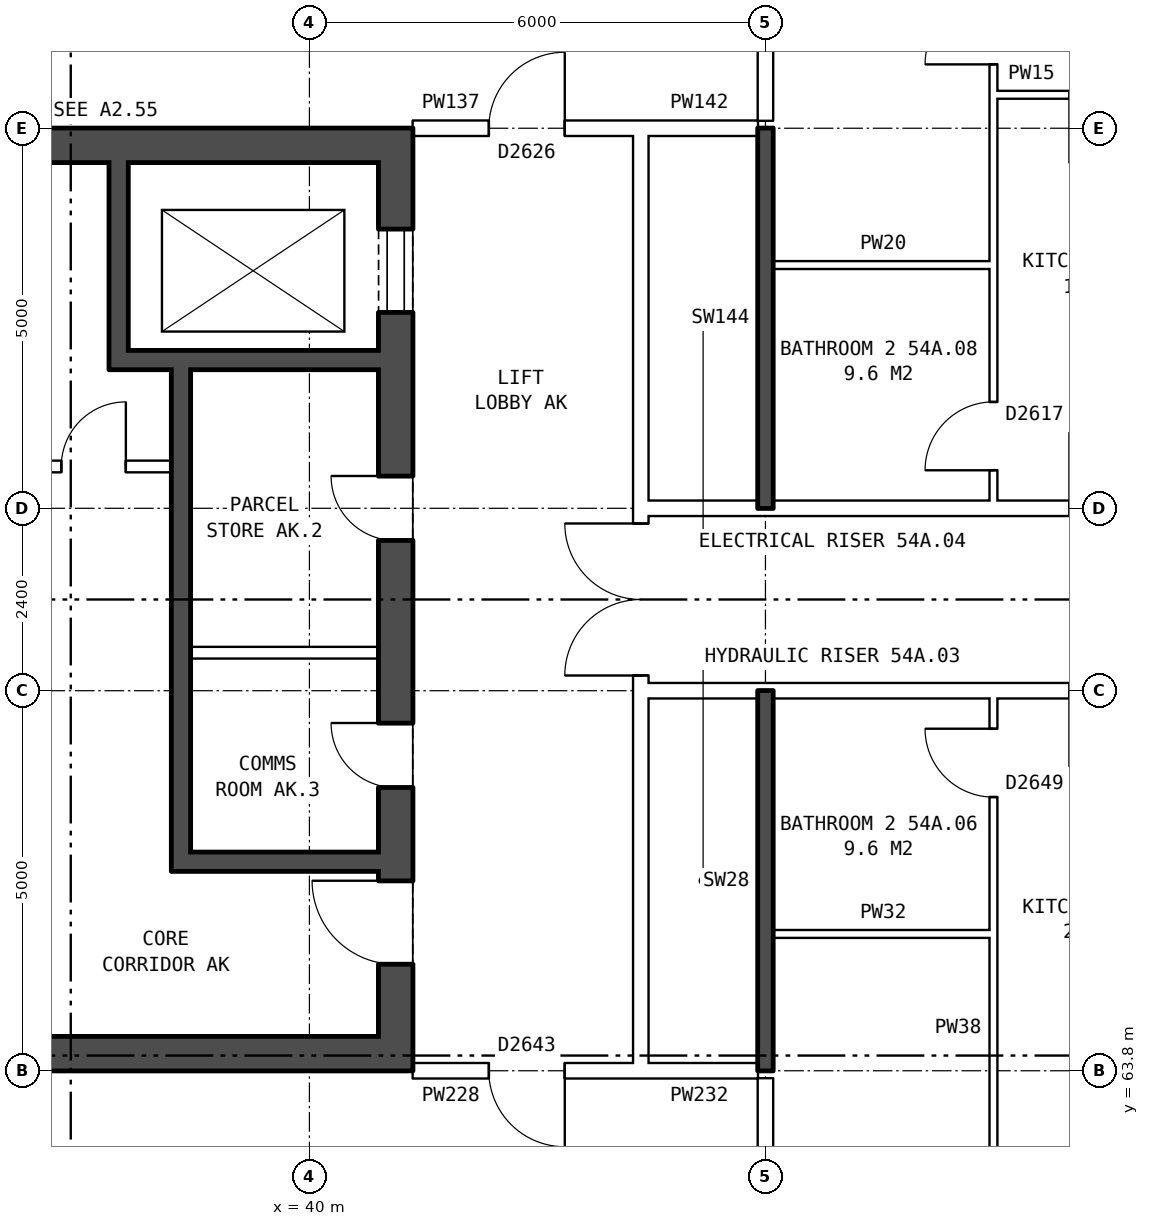
"""IFC4 building model, lengths in metres.
Left out: names, types, materials, properties, quantities, classifications, styles, units other than length and angle.
Written with IfcOpenShell. Run it as: python <this file> out.ifc"""

import sys

from ifc_helpers import new_model, si_unit, direction, frame, frame_2d, origin, place, context, subcontext, project, spatial, rectangle, extrude, element, fill, save


model = new_model("IFC4")
c1 = context("Model", 3, precision=1e-05, world=origin(), true_north=direction((0.0, 1.0)))
c2 = subcontext(c1, "Body", "Model", "MODEL_VIEW")
j1 = project(units=[si_unit("LENGTHUNIT", "METRE"), si_unit("PLANEANGLEUNIT", "RADIAN")], contexts=[c1])
p1 = place(None, origin())
s1 = spatial("IfcSite", under=j1, at=p1, CompositionType="ELEMENT")
p2 = place(p1, origin())
s2 = spatial("IfcBuilding", under=s1, at=p2, CompositionType="ELEMENT")
p3 = place(p2, frame((0.0, 0.0, 191.3)))
s3 = spatial("IfcBuildingStorey", under=s2, at=p3, CompositionType="ELEMENT", Elevation=191.3)
p4 = place(p3, frame((41.135, 76.2, 0.0), z_axis=(0.0, 0.0, 1.0), x_axis=(0.0, -1.0, 0.0)))
e1 = element("IfcWall", 1, at=p4, inside=s3, PredefinedType="SHEAR", context=c2, shape_type="SweptSolid", body=[
    extrude(rectangle(XDim=12.4, YDim=0.45, at=frame_2d((6.2, 0.0))), origin(), (0.0, 0.0, 1.0), 2.85),
])
p5 = place(p4, frame((1.325, 0.0, 0.0)))
e2 = element("IfcOpeningElement", 2, at=p5, cuts=e1, PredefinedType="OPENING", context=c2, shape_type="SweptSolid", body=[
    extrude(rectangle(XDim=1.1, YDim=2.1, at=frame_2d((0.55, 1.05))), frame((0.0, 0.235, 0.0), z_axis=(0.0, -1.0, 0.0), x_axis=(1.0, 0.0, 0.0)), (0.0, 0.0, 1.0), 0.47),
])
p6 = place(p4, frame((4.575, 0.0, 0.0)))
e3 = element("IfcOpeningElement", 3, at=p6, cuts=e1, PredefinedType="OPENING", context=c2, shape_type="SweptSolid", body=[
    extrude(rectangle(XDim=0.85, YDim=2.1, at=frame_2d((0.425, 1.05))), frame((0.0, 0.235, 0.0), z_axis=(0.0, -1.0, 0.0), x_axis=(1.0, 0.0, 0.0)), (0.0, 0.0, 1.0), 0.47),
])
p7 = place(p4, frame((7.825, 0.0, 0.0)))
e4 = element("IfcOpeningElement", 4, at=p7, cuts=e1, PredefinedType="OPENING", context=c2, shape_type="SweptSolid", body=[
    extrude(rectangle(XDim=0.85, YDim=2.1, at=frame_2d((0.425, 1.05))), frame((0.0, 0.235, 0.0), z_axis=(0.0, -1.0, 0.0), x_axis=(1.0, 0.0, 0.0)), (0.0, 0.0, 1.0), 0.47),
])
p8 = place(p4, frame((9.9, 0.0, 0.0)))
e5 = element("IfcOpeningElement", 5, at=p8, cuts=e1, PredefinedType="OPENING", context=c2, shape_type="SweptSolid", body=[
    extrude(rectangle(XDim=1.1, YDim=2.1, at=frame_2d((0.55, 1.05))), frame((0.0, 0.235, 0.0), z_axis=(0.0, -1.0, 0.0), x_axis=(1.0, 0.0, 0.0)), (0.0, 0.0, 1.0), 0.47),
])
for number, where, z_axis, x_axis in (
    (6, (40.91, 75.975, 0.0), (0.0, 0.0, 1.0), (-1.0, 0.0, 0.0)),
    (7, (40.91, 64.025, 0.0), (0.0, 0.0, 1.0), (-1.0, 0.0, 0.0)),
):
    element("IfcWall", number, at=place(p3, frame(where, z_axis=z_axis, x_axis=x_axis)), inside=s3, PredefinedType="SHEAR", context=c2, shape_type="SweptSolid", body=[
        extrude(rectangle(XDim=8.1, YDim=0.45, at=frame_2d((4.05, 0.0))), origin(), (0.0, 0.0, 1.0), 2.85),
    ])
p9 = place(p3, frame((40.91, 73.15, 0.0), z_axis=(0.0, 0.0, 1.0), x_axis=(-1.0, 0.0, 0.0)))
e8 = element("IfcWall", 8, at=p9, inside=s3, PredefinedType="SHEAR", context=c2, shape_type="SweptSolid", body=[
    extrude(rectangle(XDim=3.545, YDim=0.25, at=frame_2d((1.772, 0.0))), origin(), (0.0, 0.0, 1.0), 2.85),
])
p10 = place(p3, frame((38.185, 71.75, 0.0), z_axis=(0.0, 0.0, 1.0), x_axis=(-1.0, 0.0, 0.0)))
e9 = element("IfcWall", 9, at=p10, inside=s3, PredefinedType="PARTITIONING", context=c2, shape_type="SweptSolid", body=[
    extrude(rectangle(XDim=2.05, YDim=0.15, at=frame_2d((1.025, 0.0))), origin(), (0.0, 0.0, 1.0), 2.85),
])
p11 = place(p10, frame((0.6, 0.0, 0.0)))
e10 = element("IfcOpeningElement", 10, at=p11, cuts=e9, PredefinedType="OPENING", context=c2, shape_type="SweptSolid", body=[
    extrude(rectangle(XDim=0.85, YDim=2.1, at=frame_2d((0.425, 1.05))), frame((0.0, 0.085, 0.0), z_axis=(0.0, -1.0, 0.0), x_axis=(1.0, 0.0, 0.0)), (0.0, 0.0, 1.0), 0.17),
])
p12 = place(p3, frame((40.91, 69.3, 0.0), z_axis=(0.0, 0.0, 1.0), x_axis=(-1.0, 0.0, 0.0)))
e11 = element("IfcWall", 11, at=p12, inside=s3, PredefinedType="PARTITIONING", context=c2, shape_type="SweptSolid", body=[
    extrude(rectangle(XDim=2.475, YDim=0.15, at=frame_2d((1.237, 0.0))), origin(), (0.0, 0.0, 1.0), 2.85),
])
p13 = place(p3, frame((40.91, 66.55, 0.0), z_axis=(0.0, 0.0, 1.0), x_axis=(-1.0, 0.0, 0.0)))
e12 = element("IfcWall", 12, at=p13, inside=s3, PredefinedType="SHEAR", context=c2, shape_type="SweptSolid", body=[
    extrude(rectangle(XDim=2.475, YDim=0.25, at=frame_2d((1.237, 0.0))), origin(), (0.0, 0.0, 1.0), 2.85),
])
p14 = place(p3, frame((38.31, 73.025, 0.0), z_axis=(0.0, 0.0, 1.0), x_axis=(0.0, -1.0, 0.0)))
e13 = element("IfcWall", 13, at=p14, inside=s3, PredefinedType="SHEAR", context=c2, shape_type="SweptSolid", body=[
    extrude(rectangle(XDim=6.6, YDim=0.25, at=frame_2d((3.3, 0.0))), origin(), (0.0, 0.0, 1.0), 2.85),
])
p15 = place(p3, frame((37.49, 75.75, 0.0), z_axis=(0.0, 0.0, 1.0), x_axis=(0.0, -1.0, 0.0)))
e14 = element("IfcWall", 14, at=p15, inside=s3, PredefinedType="SHEAR", context=c2, shape_type="SweptSolid", body=[
    extrude(rectangle(XDim=2.475, YDim=0.25, at=frame_2d((1.238, 0.0))), origin(), (0.0, 0.0, 1.0), 2.85),
])
p16 = place(p3, frame((44.36, 63.9, 0.0), z_axis=(0.0, 0.0, 1.0), x_axis=(0.0, 1.0, 0.0)))
e15 = element("IfcWall", 15, at=p16, inside=s3, PredefinedType="PARTITIONING", context=c2, shape_type="SweptSolid", body=[
    extrude(rectangle(XDim=12.2, YDim=0.2, at=frame_2d((6.1, 0.0))), origin(), (0.0, 0.0, 1.0), 2.85),
])
p17 = place(p16, frame((5.1, 0.0, 0.0)))
e16 = element("IfcOpeningElement", 16, at=p17, cuts=e15, PredefinedType="OPENING", context=c2, shape_type="SweptSolid", body=[
    extrude(rectangle(XDim=2.0, YDim=2.1, at=frame_2d((1.0, 1.05))), frame((0.0, 0.11, 0.0), z_axis=(0.0, -1.0, 0.0), x_axis=(1.0, 0.0, 0.0)), (0.0, 0.0, 1.0), 0.22),
])
p18 = place(p3, frame((41.36, 63.8, 0.0), z_axis=(0.0, 0.0, 1.0), x_axis=(1.0, 0.0, 0.0)))
e17 = element("IfcWall", 17, at=p18, inside=s3, PredefinedType="PARTITIONING", context=c2, shape_type="SweptSolid", body=[
    extrude(rectangle(XDim=3.0, YDim=0.2, at=frame_2d((1.5, 0.0))), origin(), (0.0, 0.0, 1.0), 2.85),
])
p19 = place(p18, frame((1.0, 0.0, 0.0)))
e18 = element("IfcOpeningElement", 18, at=p19, cuts=e17, PredefinedType="OPENING", context=c2, shape_type="SweptSolid", body=[
    extrude(rectangle(XDim=1.0, YDim=2.1, at=frame_2d((0.5, 1.05))), frame((0.0, 0.11, 0.0), z_axis=(0.0, -1.0, 0.0), x_axis=(1.0, 0.0, 0.0)), (0.0, 0.0, 1.0), 0.22),
])
p20 = place(p3, frame((44.36, 63.8, 0.0), z_axis=(0.0, 0.0, 1.0), x_axis=(1.0, 0.0, 0.0)))
e19 = element("IfcWall", 19, at=p20, inside=s3, PredefinedType="PARTITIONING", context=c2, shape_type="SweptSolid", body=[
    extrude(rectangle(XDim=1.54, YDim=0.2, at=frame_2d((0.77, 0.0))), origin(), (0.0, 0.0, 1.0), 2.85),
])
p21 = place(p3, frame((46.1, 65.6, 0.0), z_axis=(0.0, 0.0, 1.0), x_axis=(1.0, 0.0, 0.0)))
e20 = element("IfcWall", 20, at=p21, inside=s3, PredefinedType="PARTITIONING", context=c2, shape_type="SweptSolid", body=[
    extrude(rectangle(XDim=2.9, YDim=0.1, at=frame_2d((1.45, 0.0))), origin(), (0.0, 0.0, 1.0), 2.85),
])
p22 = place(p3, frame((44.36, 68.8, 0.0), z_axis=(0.0, 0.0, 1.0), x_axis=(1.0, 0.0, 0.0)))
e21 = element("IfcWall", 21, at=p22, inside=s3, PredefinedType="PARTITIONING", context=c2, shape_type="SweptSolid", body=[
    extrude(rectangle(XDim=19.28, YDim=0.2, at=frame_2d((9.64, 0.0))), origin(), (0.0, 0.0, 1.0), 2.85),
])
p23 = place(p22, frame((14.64, 0.0, 0.0)))
e22 = element("IfcOpeningElement", 22, at=p23, cuts=e21, PredefinedType="OPENING", context=c2, shape_type="SweptSolid", body=[
    extrude(rectangle(XDim=1.0, YDim=2.1, at=frame_2d((0.5, 1.05))), frame((0.0, 0.11, 0.0), z_axis=(0.0, -1.0, 0.0), x_axis=(1.0, 0.0, 0.0)), (0.0, 0.0, 1.0), 0.22),
])
p24 = place(p22, frame((5.64, 0.0, 0.0)))
e23 = element("IfcOpeningElement", 23, at=p24, cuts=e21, PredefinedType="OPENING", context=c2, shape_type="SweptSolid", body=[
    extrude(rectangle(XDim=1.0, YDim=2.1, at=frame_2d((0.5, 1.05))), frame((0.0, 0.11, 0.0), z_axis=(0.0, -1.0, 0.0), x_axis=(1.0, 0.0, 0.0)), (0.0, 0.0, 1.0), 0.22),
])
p25 = place(p3, frame((44.36, 71.2, 0.0), z_axis=(0.0, 0.0, 1.0), x_axis=(1.0, 0.0, 0.0)))
e24 = element("IfcWall", 24, at=p25, inside=s3, PredefinedType="PARTITIONING", context=c2, shape_type="SweptSolid", body=[
    extrude(rectangle(XDim=19.28, YDim=0.2, at=frame_2d((9.64, 0.0))), origin(), (0.0, 0.0, 1.0), 2.85),
])
p26 = place(p25, frame((14.64, 0.0, 0.0)))
e25 = element("IfcOpeningElement", 25, at=p26, cuts=e24, PredefinedType="OPENING", context=c2, shape_type="SweptSolid", body=[
    extrude(rectangle(XDim=1.0, YDim=2.1, at=frame_2d((0.5, 1.05))), frame((0.0, 0.11, 0.0), z_axis=(0.0, -1.0, 0.0), x_axis=(1.0, 0.0, 0.0)), (0.0, 0.0, 1.0), 0.22),
])
p27 = place(p25, frame((5.64, 0.0, 0.0)))
e26 = element("IfcOpeningElement", 26, at=p27, cuts=e24, PredefinedType="OPENING", context=c2, shape_type="SweptSolid", body=[
    extrude(rectangle(XDim=1.0, YDim=2.1, at=frame_2d((0.5, 1.05))), frame((0.0, 0.11, 0.0), z_axis=(0.0, -1.0, 0.0), x_axis=(1.0, 0.0, 0.0)), (0.0, 0.0, 1.0), 0.22),
])
p28 = place(p3, frame((46.1, 74.4, 0.0), z_axis=(0.0, 0.0, 1.0), x_axis=(1.0, 0.0, 0.0)))
e27 = element("IfcWall", 27, at=p28, inside=s3, PredefinedType="PARTITIONING", context=c2, shape_type="SweptSolid", body=[
    extrude(rectangle(XDim=2.9, YDim=0.1, at=frame_2d((1.45, 0.0))), origin(), (0.0, 0.0, 1.0), 2.85),
])
p29 = place(p3, frame((41.36, 76.2, 0.0), z_axis=(0.0, 0.0, 1.0), x_axis=(1.0, 0.0, 0.0)))
e28 = element("IfcWall", 28, at=p29, inside=s3, PredefinedType="PARTITIONING", context=c2, shape_type="SweptSolid", body=[
    extrude(rectangle(XDim=3.0, YDim=0.2, at=frame_2d((1.5, 0.0))), origin(), (0.0, 0.0, 1.0), 2.85),
])
p30 = place(p29, frame((1.0, 0.0, 0.0)))
e29 = element("IfcOpeningElement", 29, at=p30, cuts=e28, PredefinedType="OPENING", context=c2, shape_type="SweptSolid", body=[
    extrude(rectangle(XDim=1.0, YDim=2.1, at=frame_2d((0.5, 1.05))), frame((0.0, 0.11, 0.0), z_axis=(0.0, -1.0, 0.0), x_axis=(1.0, 0.0, 0.0)), (0.0, 0.0, 1.0), 0.22),
])
p31 = place(p3, frame((44.36, 76.2, 0.0), z_axis=(0.0, 0.0, 1.0), x_axis=(1.0, 0.0, 0.0)))
e30 = element("IfcWall", 30, at=p31, inside=s3, PredefinedType="PARTITIONING", context=c2, shape_type="SweptSolid", body=[
    extrude(rectangle(XDim=1.54, YDim=0.2, at=frame_2d((0.77, 0.0))), origin(), (0.0, 0.0, 1.0), 2.85),
])
p32 = place(p3, frame((49.0, 76.64, 0.0), z_axis=(0.0, 0.0, 1.0), x_axis=(1.0, 0.0, 0.0)))
e31 = element("IfcWall", 31, at=p32, inside=s3, PredefinedType="PARTITIONING", context=c2, shape_type="SweptSolid", body=[
    extrude(rectangle(XDim=2.9, YDim=0.1, at=frame_2d((1.45, 0.0))), origin(), (0.0, 0.0, 1.0), 2.85),
])
p33 = place(p32, frame((1.0, 0.0, 0.0)))
e32 = element("IfcOpeningElement", 32, at=p33, cuts=e31, PredefinedType="OPENING", context=c2, shape_type="SweptSolid", body=[
    extrude(rectangle(XDim=0.9, YDim=2.1, at=frame_2d((0.45, 1.05))), frame((0.0, 0.06, 0.0), z_axis=(0.0, -1.0, 0.0), x_axis=(1.0, 0.0, 0.0)), (0.0, 0.0, 1.0), 0.12),
])
p34 = place(p3, frame((46.0, 61.5, 0.0), z_axis=(0.0, 0.0, 1.0), x_axis=(0.0, 1.0, 0.0)))
e33 = element("IfcWall", 33, at=p34, inside=s3, PredefinedType="PARTITIONING", context=c2, shape_type="SweptSolid", body=[
    extrude(rectangle(XDim=2.2, YDim=0.2, at=frame_2d((1.1, 0.0))), origin(), (0.0, 0.0, 1.0), 2.85),
])
for number, where, z_axis, x_axis in (
    (34, (46.0, 63.8, 0.0), (0.0, 0.0, 1.0), (0.0, 1.0, 0.0)),
    (35, (46.0, 71.2, 0.0), (0.0, 0.0, 1.0), (0.0, 1.0, 0.0)),
):
    element("IfcWall", number, at=place(p3, frame(where, z_axis=z_axis, x_axis=x_axis)), inside=s3, PredefinedType="SOLIDWALL", context=c2, shape_type="SweptSolid", body=[
        extrude(rectangle(XDim=5.0, YDim=0.2, at=frame_2d((2.5, 0.0))), origin(), (0.0, 0.0, 1.0), 2.85),
    ])
p35 = place(p3, frame((46.0, 76.3, 0.0), z_axis=(0.0, 0.0, 1.0), x_axis=(0.0, 1.0, 0.0)))
e36 = element("IfcWall", 36, at=p35, inside=s3, PredefinedType="PARTITIONING", context=c2, shape_type="SweptSolid", body=[
    extrude(rectangle(XDim=2.2, YDim=0.2, at=frame_2d((1.1, 0.0))), origin(), (0.0, 0.0, 1.0), 2.85),
])
p36 = place(p3, frame((49.0, 54.36, 0.0), z_axis=(0.0, 0.0, 1.0), x_axis=(0.0, 1.0, 0.0)))
e37 = element("IfcWall", 37, at=p36, inside=s3, PredefinedType="PARTITIONING", context=c2, shape_type="SweptSolid", body=[
    extrude(rectangle(XDim=14.34, YDim=0.1, at=frame_2d((7.17, 0.0))), origin(), (0.0, 0.0, 1.0), 2.85),
])
p37 = place(p36, frame((5.5, 0.0, 0.0)))
e38 = element("IfcOpeningElement", 38, at=p37, cuts=e37, PredefinedType="OPENING", context=c2, shape_type="SweptSolid", body=[
    extrude(rectangle(XDim=0.9, YDim=2.1, at=frame_2d((0.45, 1.05))), frame((0.0, 0.06, 0.0), z_axis=(0.0, -1.0, 0.0), x_axis=(1.0, 0.0, 0.0)), (0.0, 0.0, 1.0), 0.12),
])
p38 = place(p36, frame((13.04, 0.0, 0.0)))
e39 = element("IfcOpeningElement", 39, at=p38, cuts=e37, PredefinedType="OPENING", context=c2, shape_type="SweptSolid", body=[
    extrude(rectangle(XDim=0.9, YDim=2.1, at=frame_2d((0.45, 1.05))), frame((0.0, 0.06, 0.0), z_axis=(0.0, -1.0, 0.0), x_axis=(1.0, 0.0, 0.0)), (0.0, 0.0, 1.0), 0.12),
])
p39 = place(p3, frame((49.0, 71.3, 0.0), z_axis=(0.0, 0.0, 1.0), x_axis=(0.0, 1.0, 0.0)))
e40 = element("IfcWall", 40, at=p39, inside=s3, PredefinedType="PARTITIONING", context=c2, shape_type="SweptSolid", body=[
    extrude(rectangle(XDim=14.34, YDim=0.1, at=frame_2d((7.17, 0.0))), origin(), (0.0, 0.0, 1.0), 2.85),
])
p40 = place(p39, frame((5.74, 0.0, 0.0)))
e41 = element("IfcOpeningElement", 41, at=p40, cuts=e40, PredefinedType="OPENING", context=c2, shape_type="SweptSolid", body=[
    extrude(rectangle(XDim=0.9, YDim=2.1, at=frame_2d((0.45, 1.05))), frame((0.0, 0.06, 0.0), z_axis=(0.0, -1.0, 0.0), x_axis=(1.0, 0.0, 0.0)), (0.0, 0.0, 1.0), 0.12),
])
p41 = place(p39, frame((0.4, 0.0, 0.0)))
e42 = element("IfcOpeningElement", 42, at=p41, cuts=e40, PredefinedType="OPENING", context=c2, shape_type="SweptSolid", body=[
    extrude(rectangle(XDim=0.9, YDim=2.1, at=frame_2d((0.45, 1.05))), frame((0.0, 0.06, 0.0), z_axis=(0.0, -1.0, 0.0), x_axis=(1.0, 0.0, 0.0)), (0.0, 0.0, 1.0), 0.12),
])
p42 = place(p5, origin())
e43 = element("IfcDoor", 43, at=p42, inside=s3, OperationType="DOUBLE_DOOR_SLIDING", PredefinedType="DOOR", context=c2, shape_type="SweptSolid", body=[
    extrude(rectangle(XDim=1.1, YDim=2.1, at=frame_2d((0.55, 1.05))), frame((0.0, -0.16, 0.0), z_axis=(0.0, -1.0, 0.0), x_axis=(1.0, 0.0, 0.0)), (0.0, 0.0, 1.0), 0.05),
])
fill(e2, e43)
p43 = place(p6, frame((0.85, 0.0, 0.0), z_axis=(0.0, 0.0, 1.0), x_axis=(-1.0, 0.0, 0.0)))
e44 = element("IfcDoor", 44, at=p43, inside=s3, OperationType="SINGLE_SWING_RIGHT", PredefinedType="DOOR", context=c2, shape_type="SweptSolid", body=[
    extrude(rectangle(XDim=0.85, YDim=2.1, at=frame_2d((0.425, 1.05))), frame((0.0, 0.21, 0.0), z_axis=(0.0, -1.0, 0.0), x_axis=(1.0, 0.0, 0.0)), (0.0, 0.0, 1.0), 0.05),
])
fill(e3, e44)
p44 = place(p7, frame((0.85, 0.0, 0.0), z_axis=(0.0, 0.0, 1.0), x_axis=(-1.0, 0.0, 0.0)))
e45 = element("IfcDoor", 45, at=p44, inside=s3, OperationType="SINGLE_SWING_RIGHT", PredefinedType="DOOR", context=c2, shape_type="SweptSolid", body=[
    extrude(rectangle(XDim=0.85, YDim=2.1, at=frame_2d((0.425, 1.05))), frame((0.0, 0.21, 0.0), z_axis=(0.0, -1.0, 0.0), x_axis=(1.0, 0.0, 0.0)), (0.0, 0.0, 1.0), 0.05),
])
fill(e4, e45)
p45 = place(p8, frame((1.1, 0.0, 0.0), z_axis=(0.0, 0.0, 1.0), x_axis=(-1.0, 0.0, 0.0)))
e46 = element("IfcDoor", 46, at=p45, inside=s3, OperationType="SINGLE_SWING_RIGHT", PredefinedType="DOOR", context=c2, shape_type="SweptSolid", body=[
    extrude(rectangle(XDim=1.1, YDim=2.1, at=frame_2d((0.55, 1.05))), frame((0.0, 0.21, 0.0), z_axis=(0.0, -1.0, 0.0), x_axis=(1.0, 0.0, 0.0)), (0.0, 0.0, 1.0), 0.05),
])
fill(e5, e46)
p46 = place(p11, frame((0.85, 0.0, 0.0), z_axis=(0.0, 0.0, 1.0), x_axis=(-1.0, 0.0, 0.0)))
e47 = element("IfcDoor", 47, at=p46, inside=s3, OperationType="SINGLE_SWING_RIGHT", PredefinedType="DOOR", context=c2, shape_type="SweptSolid", body=[
    extrude(rectangle(XDim=0.85, YDim=2.1, at=frame_2d((0.425, 1.05))), frame((0.0, 0.025, 0.0), z_axis=(0.0, -1.0, 0.0), x_axis=(1.0, 0.0, 0.0)), (0.0, 0.0, 1.0), 0.05),
])
fill(e10, e47)
p47 = place(p17, origin())
e48 = element("IfcDoor", 48, at=p47, inside=s3, OperationType="DOUBLE_DOOR_SINGLE_SWING", PredefinedType="DOOR", context=c2, shape_type="SweptSolid", body=[
    extrude(rectangle(XDim=2.0, YDim=2.1, at=frame_2d((1.0, 1.05))), frame((0.0, 0.025, 0.0), z_axis=(0.0, -1.0, 0.0), x_axis=(1.0, 0.0, 0.0)), (0.0, 0.0, 1.0), 0.05),
])
fill(e16, e48)
p48 = place(p19, frame((1.0, 0.0, 0.0), z_axis=(0.0, 0.0, 1.0), x_axis=(-1.0, 0.0, 0.0)))
e49 = element("IfcDoor", 49, at=p48, inside=s3, OperationType="SINGLE_SWING_LEFT", PredefinedType="DOOR", context=c2, shape_type="SweptSolid", body=[
    extrude(rectangle(XDim=1.0, YDim=2.1, at=frame_2d((0.5, 1.05))), frame((0.0, 0.025, 0.0), z_axis=(0.0, -1.0, 0.0), x_axis=(1.0, 0.0, 0.0)), (0.0, 0.0, 1.0), 0.05),
])
fill(e18, e49)
p49 = place(p30, origin())
e50 = element("IfcDoor", 50, at=p49, inside=s3, OperationType="SINGLE_SWING_RIGHT", PredefinedType="DOOR", context=c2, shape_type="SweptSolid", body=[
    extrude(rectangle(XDim=1.0, YDim=2.1, at=frame_2d((0.5, 1.05))), frame((0.0, 0.025, 0.0), z_axis=(0.0, -1.0, 0.0), x_axis=(1.0, 0.0, 0.0)), (0.0, 0.0, 1.0), 0.05),
])
fill(e29, e50)
p50 = place(p38, origin())
e51 = element("IfcDoor", 51, at=p50, inside=s3, OperationType="SINGLE_SWING_RIGHT", PredefinedType="DOOR", context=c2, shape_type="SweptSolid", body=[
    extrude(rectangle(XDim=0.9, YDim=2.1, at=frame_2d((0.45, 1.05))), frame((0.0, 0.025, 0.0), z_axis=(0.0, -1.0, 0.0), x_axis=(1.0, 0.0, 0.0)), (0.0, 0.0, 1.0), 0.05),
])
fill(e39, e51)
p51 = place(p40, origin())
e52 = element("IfcDoor", 52, at=p51, inside=s3, OperationType="SINGLE_SWING_LEFT", PredefinedType="DOOR", context=c2, shape_type="SweptSolid", body=[
    extrude(rectangle(XDim=0.9, YDim=2.1, at=frame_2d((0.45, 1.05))), frame((0.0, 0.025, 0.0), z_axis=(0.0, -1.0, 0.0), x_axis=(1.0, 0.0, 0.0)), (0.0, 0.0, 1.0), 0.05),
])
fill(e41, e52)
p52 = place(p41, origin())
e53 = element("IfcDoor", 53, at=p52, inside=s3, OperationType="SINGLE_SWING_LEFT", PredefinedType="DOOR", context=c2, shape_type="SweptSolid", body=[
    extrude(rectangle(XDim=0.9, YDim=2.1, at=frame_2d((0.45, 1.05))), frame((0.0, 0.025, 0.0), z_axis=(0.0, -1.0, 0.0), x_axis=(1.0, 0.0, 0.0)), (0.0, 0.0, 1.0), 0.05),
])
fill(e42, e53)
save(model, sys.argv[1])
